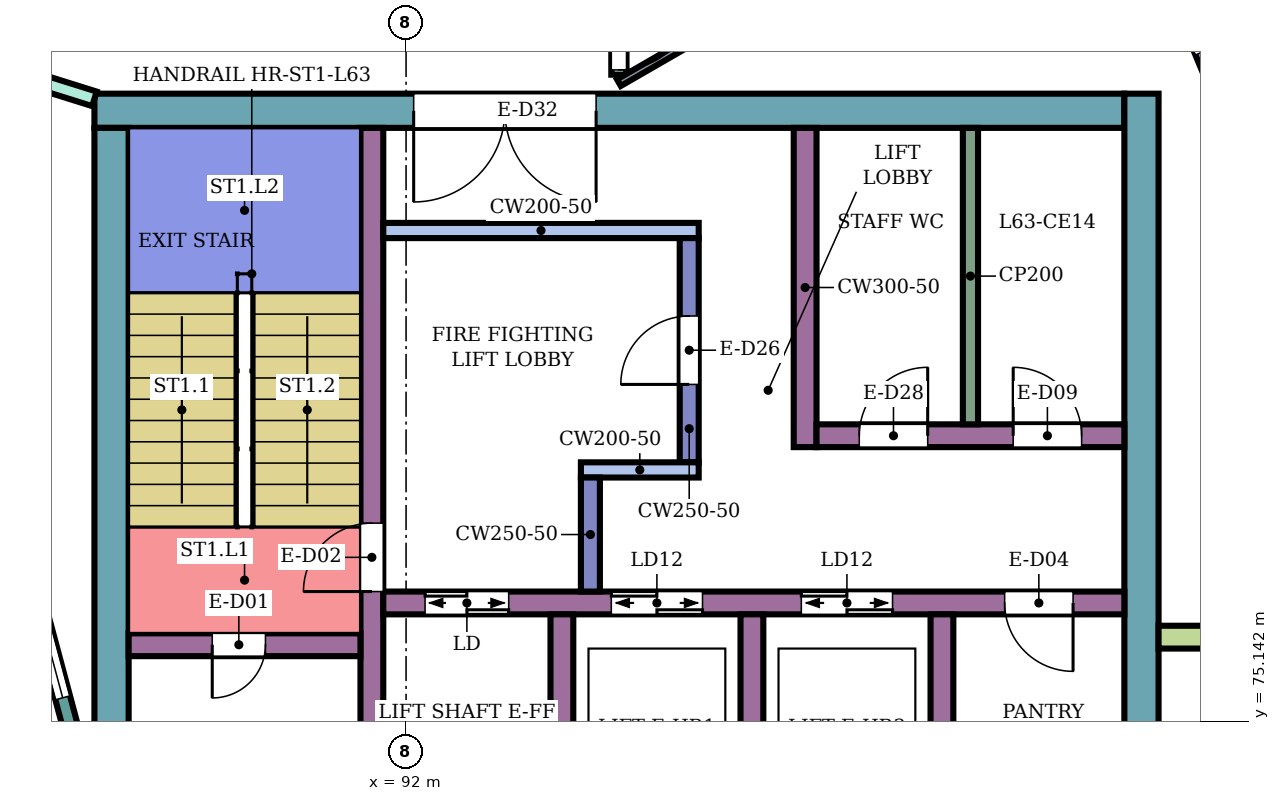
"""IFC4 building model, lengths in metres.
Left out: names, types, materials, properties, quantities, classifications, styles, units other than length and angle.
Written with IfcOpenShell. Run it as: python <this file> out.ifc"""

import sys

from ifc_helpers import new_model, si_unit, direction, frame, frame_2d, origin, place, context, subcontext, project, spatial, rectangle, extrude, element, fill, save


model = new_model("IFC4")
c1 = context("Model", 3, precision=1e-05, world=origin(), true_north=direction((0.0, 1.0)))
c2 = subcontext(c1, "Body", "Model", "MODEL_VIEW")
j1 = project(units=[si_unit("LENGTHUNIT", "METRE"), si_unit("PLANEANGLEUNIT", "RADIAN")], contexts=[c1])
p1 = place(None, origin())
s1 = spatial("IfcSite", under=j1, at=p1, CompositionType="ELEMENT")
p2 = place(p1, origin())
s2 = spatial("IfcBuilding", under=s1, at=p2, CompositionType="ELEMENT")
p3 = place(p2, frame((0.0, 0.0, 275.7)))
s3 = spatial("IfcBuildingStorey", under=s2, at=p3, CompositionType="ELEMENT", Elevation=275.7)
p4 = place(p3, frame((87.9, 83.175, 0.0), z_axis=(0.0, 0.0, 1.0), x_axis=(1.0, 0.0, 0.0)))
e1 = element("IfcWall", 1, at=p4, inside=s3, PredefinedType="SHEAR", context=c2, shape_type="SweptSolid", body=[
    extrude(rectangle(XDim=13.55, YDim=0.45, at=frame_2d((6.775, 0.0))), origin(), (0.0, 0.0, 1.0), 3.88),
])
p5 = place(p4, frame((4.2, 0.0, 0.0)))
e2 = element("IfcOpeningElement", 2, at=p5, cuts=e1, PredefinedType="OPENING", context=c2, shape_type="SweptSolid", body=[
    extrude(rectangle(XDim=2.4, YDim=2.4, at=frame_2d((1.2, 1.2))), frame((0.0, 0.235, 0.0), z_axis=(0.0, -1.0, 0.0), x_axis=(1.0, 0.0, 0.0)), (0.0, 0.0, 1.0), 0.47),
])
p6 = place(p3, frame((88.125, 75.0, 0.0), z_axis=(0.0, 0.0, 1.0), x_axis=(0.0, 1.0, 0.0)))
e3 = element("IfcWall", 3, at=p6, inside=s3, PredefinedType="SHEAR", context=c2, shape_type="SweptSolid", body=[
    extrude(rectangle(XDim=7.95, YDim=0.45, at=frame_2d((3.975, 0.0))), origin(), (0.0, 0.0, 1.0), 3.88),
])
p7 = place(p3, frame((101.675, 66.6, 0.0), z_axis=(0.0, 0.0, 1.0), x_axis=(0.0, 1.0, 0.0)))
e4 = element("IfcWall", 4, at=p7, inside=s3, PredefinedType="SHEAR", context=c2, shape_type="SweptSolid", body=[
    extrude(rectangle(XDim=16.8, YDim=0.45, at=frame_2d((8.4, 0.0))), origin(), (0.0, 0.0, 1.0), 3.88),
])
p8 = place(p3, frame((91.55, 75.0, 0.0), z_axis=(0.0, 0.0, 1.0), x_axis=(0.0, 1.0, 0.0)))
e5 = element("IfcWall", 5, at=p8, inside=s3, PredefinedType="SHEAR", context=c2, shape_type="SweptSolid", body=[
    extrude(rectangle(XDim=7.95, YDim=0.3, at=frame_2d((3.975, 0.0))), origin(), (0.0, 0.0, 1.0), 3.88),
])
p9 = place(p8, frame((1.85, 0.0, 0.0)))
e6 = element("IfcOpeningElement", 6, at=p9, cuts=e5, PredefinedType="OPENING", context=c2, shape_type="SweptSolid", body=[
    extrude(rectangle(XDim=0.9, YDim=2.1, at=frame_2d((0.45, 1.05))), frame((0.0, 0.16, 0.0), z_axis=(0.0, -1.0, 0.0), x_axis=(1.0, 0.0, 0.0)), (0.0, 0.0, 1.0), 0.32),
])
p10 = place(p3, frame((88.35, 76.15, 0.0), z_axis=(0.0, 0.0, 1.0), x_axis=(1.0, 0.0, 0.0)))
e7 = element("IfcWall", 7, at=p10, inside=s3, PredefinedType="SHEAR", context=c2, shape_type="SweptSolid", body=[
    extrude(rectangle(XDim=3.05, YDim=0.3, at=frame_2d((1.525, 0.0))), origin(), (0.0, 0.0, 1.0), 3.88),
])
p11 = place(p10, frame((1.1, 0.0, 0.0)))
e8 = element("IfcOpeningElement", 8, at=p11, cuts=e7, PredefinedType="OPENING", context=c2, shape_type="SweptSolid", body=[
    extrude(rectangle(XDim=0.7, YDim=2.0, at=frame_2d((0.35, 1.0))), frame((0.0, 0.16, 0.0), z_axis=(0.0, -1.0, 0.0), x_axis=(1.0, 0.0, 0.0)), (0.0, 0.0, 1.0), 0.32),
])
p12 = place(p3, frame((91.7, 76.7, 0.0), z_axis=(0.0, 0.0, 1.0), x_axis=(1.0, 0.0, 0.0)))
e9 = element("IfcWall", 9, at=p12, inside=s3, PredefinedType="SHEAR", context=c2, shape_type="SweptSolid", body=[
    extrude(rectangle(XDim=9.75, YDim=0.3, at=frame_2d((4.875, 0.0))), origin(), (0.0, 0.0, 1.0), 3.88),
])
p13 = place(p12, frame((0.55, 0.0, 0.0)))
e10 = element("IfcOpeningElement", 10, at=p13, cuts=e9, PredefinedType="OPENING", context=c2, shape_type="SweptSolid", body=[
    extrude(rectangle(XDim=1.1, YDim=2.1, at=frame_2d((0.55, 1.05))), frame((0.0, 0.16, 0.0), z_axis=(0.0, -1.0, 0.0), x_axis=(1.0, 0.0, 0.0)), (0.0, 0.0, 1.0), 0.32),
])
p14 = place(p12, frame((3.0, 0.0, 0.0)))
e11 = element("IfcOpeningElement", 11, at=p14, cuts=e9, PredefinedType="OPENING", context=c2, shape_type="SweptSolid", body=[
    extrude(rectangle(XDim=1.2, YDim=2.1, at=frame_2d((0.6, 1.05))), frame((0.0, 0.16, 0.0), z_axis=(0.0, -1.0, 0.0), x_axis=(1.0, 0.0, 0.0)), (0.0, 0.0, 1.0), 0.32),
])
p15 = place(p12, frame((5.5, 0.0, 0.0)))
e12 = element("IfcOpeningElement", 12, at=p15, cuts=e9, PredefinedType="OPENING", context=c2, shape_type="SweptSolid", body=[
    extrude(rectangle(XDim=1.2, YDim=2.1, at=frame_2d((0.6, 1.05))), frame((0.0, 0.16, 0.0), z_axis=(0.0, -1.0, 0.0), x_axis=(1.0, 0.0, 0.0)), (0.0, 0.0, 1.0), 0.32),
])
p16 = place(p12, frame((8.175, 0.0, 0.0)))
e13 = element("IfcOpeningElement", 13, at=p16, cuts=e9, PredefinedType="OPENING", context=c2, shape_type="SweptSolid", body=[
    extrude(rectangle(XDim=0.9, YDim=2.1, at=frame_2d((0.45, 1.05))), frame((0.0, 0.16, 0.0), z_axis=(0.0, -1.0, 0.0), x_axis=(1.0, 0.0, 0.0)), (0.0, 0.0, 1.0), 0.32),
])
for number, where, z_axis, x_axis in (
    (14, (94.05, 74.0, 0.0), (0.0, 0.0, 1.0), (0.0, 1.0, 0.0)),
    (15, (96.55, 74.0, 0.0), (0.0, 0.0, 1.0), (0.0, 1.0, 0.0)),
    (16, (99.05, 74.0, 0.0), (0.0, 0.0, 1.0), (0.0, 1.0, 0.0)),
):
    element("IfcWall", number, at=place(p3, frame(where, z_axis=z_axis, x_axis=x_axis)), inside=s3, PredefinedType="SHEAR", context=c2, shape_type="SweptSolid", body=[
        extrude(rectangle(XDim=2.55, YDim=0.3, at=frame_2d((1.275, 0.0))), origin(), (0.0, 0.0, 1.0), 3.88),
    ])
p17 = place(p3, frame((91.7, 81.6, 0.0), z_axis=(0.0, 0.0, 1.0), x_axis=(1.0, 0.0, 0.0)))
e17 = element("IfcWall", 17, at=p17, inside=s3, PredefinedType="SHEAR", context=c2, shape_type="SweptSolid", body=[
    extrude(rectangle(XDim=4.15, YDim=0.2, at=frame_2d((2.075, 0.0))), origin(), (0.0, 0.0, 1.0), 3.88),
])
p18 = place(p3, frame((95.725, 78.55, 0.0), z_axis=(0.0, 0.0, 1.0), x_axis=(0.0, 1.0, 0.0)))
e18 = element("IfcWall", 18, at=p18, inside=s3, PredefinedType="SHEAR", context=c2, shape_type="SweptSolid", body=[
    extrude(rectangle(XDim=2.95, YDim=0.25, at=frame_2d((1.475, 0.0))), origin(), (0.0, 0.0, 1.0), 3.88),
])
p19 = place(p18, frame((1.025, 0.0, 0.0)))
e19 = element("IfcOpeningElement", 19, at=p19, cuts=e18, PredefinedType="OPENING", context=c2, shape_type="SweptSolid", body=[
    extrude(rectangle(XDim=0.9, YDim=2.1, at=frame_2d((0.45, 1.05))), frame((0.0, 0.135, 0.0), z_axis=(0.0, -1.0, 0.0), x_axis=(1.0, 0.0, 0.0)), (0.0, 0.0, 1.0), 0.27),
])
p20 = place(p3, frame((94.3, 78.45, 0.0), z_axis=(0.0, 0.0, 1.0), x_axis=(1.0, 0.0, 0.0)))
e20 = element("IfcWall", 20, at=p20, inside=s3, PredefinedType="SHEAR", context=c2, shape_type="SweptSolid", body=[
    extrude(rectangle(XDim=1.55, YDim=0.2, at=frame_2d((0.775, 0.0))), origin(), (0.0, 0.0, 1.0), 3.88),
])
p21 = place(p3, frame((94.425, 76.85, 0.0), z_axis=(0.0, 0.0, 1.0), x_axis=(0.0, 1.0, 0.0)))
e21 = element("IfcWall", 21, at=p21, inside=s3, PredefinedType="SHEAR", context=c2, shape_type="SweptSolid", body=[
    extrude(rectangle(XDim=1.5, YDim=0.25, at=frame_2d((0.75, 0.0))), origin(), (0.0, 0.0, 1.0), 3.88),
])
p22 = place(p3, frame((97.25, 78.75, 0.0), z_axis=(0.0, 0.0, 1.0), x_axis=(0.0, 1.0, 0.0)))
e22 = element("IfcWall", 22, at=p22, inside=s3, PredefinedType="SHEAR", context=c2, shape_type="SweptSolid", body=[
    extrude(rectangle(XDim=4.2, YDim=0.3, at=frame_2d((2.1, 0.0))), origin(), (0.0, 0.0, 1.0), 3.88),
])
p23 = place(p3, frame((97.4, 78.9, 0.0), z_axis=(0.0, 0.0, 1.0), x_axis=(1.0, 0.0, 0.0)))
e23 = element("IfcWall", 23, at=p23, inside=s3, PredefinedType="SHEAR", context=c2, shape_type="SweptSolid", body=[
    extrude(rectangle(XDim=4.05, YDim=0.3, at=frame_2d((2.025, 0.0))), origin(), (0.0, 0.0, 1.0), 3.88),
])
p24 = place(p23, frame((0.562, 0.0, 0.0)))
e24 = element("IfcOpeningElement", 24, at=p24, cuts=e23, PredefinedType="OPENING", context=c2, shape_type="SweptSolid", body=[
    extrude(rectangle(XDim=0.9, YDim=2.1, at=frame_2d((0.45, 1.05))), frame((0.0, 0.16, 0.0), z_axis=(0.0, -1.0, 0.0), x_axis=(1.0, 0.0, 0.0)), (0.0, 0.0, 1.0), 0.32),
])
p25 = place(p23, frame((2.587, 0.0, 0.0)))
e25 = element("IfcOpeningElement", 25, at=p25, cuts=e23, PredefinedType="OPENING", context=c2, shape_type="SweptSolid", body=[
    extrude(rectangle(XDim=0.9, YDim=2.1, at=frame_2d((0.45, 1.05))), frame((0.0, 0.16, 0.0), z_axis=(0.0, -1.0, 0.0), x_axis=(1.0, 0.0, 0.0)), (0.0, 0.0, 1.0), 0.32),
])
p26 = place(p3, frame((103.568, 81.315, 0.0), z_axis=(0.0, 0.0, 1.0), x_axis=(-0.382690319485, 0.923876679743, 0.0)))
e26 = element("IfcWall", 26, at=p26, inside=s3, PredefinedType="NOTDEFINED", context=c2, shape_type="SweptSolid", body=[
    extrude(rectangle(XDim=6.369, YDim=0.2, at=frame_2d((3.185, 0.0))), origin(), (0.0, 0.0, 1.0), 4.2),
])
p27 = place(p26, frame((1.2, 0.0, 0.9)))
e27 = element("IfcOpeningElement", 27, at=p27, cuts=e26, PredefinedType="OPENING", context=c2, shape_type="SweptSolid", body=[
    extrude(rectangle(XDim=1.2, YDim=2.7, at=frame_2d((0.6, 1.35))), frame((0.0, 0.11, 0.0), z_axis=(0.0, -1.0, 0.0), x_axis=(1.0, 0.0, 0.0)), (0.0, 0.0, 1.0), 0.22),
])
p28 = place(p26, frame((2.85, 0.0, 0.0)))
e28 = element("IfcOpeningElement", 28, at=p28, cuts=e26, PredefinedType="OPENING", context=c2, shape_type="SweptSolid", body=[
    extrude(rectangle(XDim=1.8, YDim=2.7, at=frame_2d((0.9, 1.35))), frame((0.0, 0.11, 0.0), z_axis=(0.0, -1.0, 0.0), x_axis=(1.0, 0.0, 0.0)), (0.0, 0.0, 1.0), 0.22),
])
p29 = place(p3, frame((101.9, 76.25, 0.0), z_axis=(0.0, 0.0, 1.0), x_axis=(1.0, 0.0, 0.0)))
e29 = element("IfcWall", 29, at=p29, inside=s3, PredefinedType="NOTDEFINED", context=c2, shape_type="SweptSolid", body=[
    extrude(rectangle(XDim=2.416, YDim=0.3, at=frame_2d((1.208, 0.0))), origin(), (0.0, 0.0, 1.0), 4.2),
])
p30 = place(p3, frame((87.604, 75.0, 0.0), z_axis=(0.0, 0.0, 1.0), x_axis=(-0.258789828301, 0.965933654434, 0.0)))
e30 = element("IfcWall", 30, at=p30, inside=s3, PredefinedType="NOTDEFINED", context=c2, shape_type="SweptSolid", body=[
    extrude(rectangle(XDim=3.936, YDim=0.2, at=frame_2d((1.968, 0.0))), origin(), (0.0, 0.0, 1.0), 4.2),
])
p31 = place(p30, frame((0.468, 0.0, 0.9)))
e31 = element("IfcOpeningElement", 31, at=p31, cuts=e30, PredefinedType="OPENING", context=c2, shape_type="SweptSolid", body=[
    extrude(rectangle(XDim=3.0, YDim=2.3, at=frame_2d((1.5, 1.15))), frame((0.0, 0.11, 0.0), z_axis=(0.0, -1.0, 0.0), x_axis=(1.0, 0.0, 0.0)), (0.0, 0.0, 1.0), 0.22),
])
p32 = place(p3, frame((85.587, 84.057, 0.0), z_axis=(0.0, 0.0, 1.0), x_axis=(0.954239513179, -0.299043393987, 0.0)))
e32 = element("IfcWall", 32, at=p32, inside=s3, PredefinedType="PARTITIONING", context=c2, shape_type="SweptSolid", body=[
    extrude(rectangle(XDim=2.424, YDim=0.2, at=frame_2d((1.212, 0.0))), origin(), (0.0, 0.0, 1.0), 3.75),
])
p33 = place(p32, frame((0.762, 0.0, 0.0)))
e33 = element("IfcOpeningElement", 33, at=p33, cuts=e32, PredefinedType="OPENING", context=c2, shape_type="SweptSolid", body=[
    extrude(rectangle(XDim=0.9, YDim=2.1, at=frame_2d((0.45, 1.05))), frame((0.0, 0.11, 0.0), z_axis=(0.0, -1.0, 0.0), x_axis=(1.0, 0.0, 0.0)), (0.0, 0.0, 1.0), 0.22),
])
p34 = place(p3, frame((94.8, 83.65, 0.0), z_axis=(0.0, 0.0, 1.0), x_axis=(0.0, 1.0, 0.0)))
e34 = element("IfcWall", 34, at=p34, inside=s3, PredefinedType="PARTITIONING", context=c2, shape_type="SweptSolid", body=[
    extrude(rectangle(XDim=1.25, YDim=0.2, at=frame_2d((0.625, 0.0))), origin(), (0.0, 0.0, 1.0), 3.75),
])
p35 = place(p34, frame((0.062, 0.0, 0.0)))
e35 = element("IfcOpeningElement", 35, at=p35, cuts=e34, PredefinedType="OPENING", context=c2, shape_type="SweptSolid", body=[
    extrude(rectangle(XDim=1.0, YDim=2.1, at=frame_2d((0.5, 1.05))), frame((0.0, 0.11, 0.0), z_axis=(0.0, -1.0, 0.0), x_axis=(1.0, 0.0, 0.0)), (0.0, 0.0, 1.0), 0.22),
])
p36 = place(p3, frame((94.8, 83.545, 0.0), z_axis=(0.0, 0.0, 1.0), x_axis=(0.866044015472, 0.499967762227, 0.0)))
e36 = element("IfcWall", 36, at=p36, inside=s3, PredefinedType="PARTITIONING", context=c2, shape_type="SweptSolid", body=[
    extrude(rectangle(XDim=7.208, YDim=0.1, at=frame_2d((3.604, 0.0))), origin(), (0.0, 0.0, 1.0), 3.75),
])
p37 = place(p36, frame((3.129, 0.0, 0.0)))
e37 = element("IfcOpeningElement", 37, at=p37, cuts=e36, PredefinedType="OPENING", context=c2, shape_type="SweptSolid", body=[
    extrude(rectangle(XDim=0.9, YDim=2.1, at=frame_2d((0.45, 1.05))), frame((0.0, 0.06, 0.0), z_axis=(0.0, -1.0, 0.0), x_axis=(1.0, 0.0, 0.0)), (0.0, 0.0, 1.0), 0.12),
])
p38 = place(p3, frame((99.425, 79.05, 0.0), z_axis=(0.0, 0.0, 1.0), x_axis=(0.0, 1.0, 0.0)))
e38 = element("IfcWall", 38, at=p38, inside=s3, PredefinedType="PARTITIONING", context=c2, shape_type="SweptSolid", body=[
    extrude(rectangle(XDim=3.9, YDim=0.2, at=frame_2d((1.95, 0.0))), origin(), (0.0, 0.0, 1.0), 3.88),
])
p39 = place(p28, frame((1.8, 0.0, 0.0), z_axis=(0.0, 0.0, 1.0), x_axis=(-1.0, 0.0, 0.0)))
e39 = element("IfcDoor", 39, at=p39, inside=s3, OperationType="DOUBLE_DOOR_SINGLE_SWING", PredefinedType="DOOR", context=c2, shape_type="SweptSolid", body=[
    extrude(rectangle(XDim=1.8, YDim=2.7, at=frame_2d((0.9, 1.35))), frame((0.0, 0.025, 0.0), z_axis=(0.0, -1.0, 0.0), x_axis=(1.0, 0.0, 0.0)), (0.0, 0.0, 1.0), 0.05),
])
fill(e28, e39)
p40 = place(p31, origin())
e40 = element("IfcWindow", 40, at=p40, inside=s3, PartitioningType="SINGLE_PANEL", PredefinedType="WINDOW", context=c2, shape_type="SweptSolid", body=[
    extrude(rectangle(XDim=3.0, YDim=2.3, at=frame_2d((1.5, 1.15))), frame((0.0, 0.03, 0.0), z_axis=(0.0, -1.0, 0.0), x_axis=(1.0, 0.0, 0.0)), (0.0, 0.0, 1.0), 0.06),
])
fill(e31, e40)
p41 = place(p35, frame((1.0, 0.0, 0.0), z_axis=(0.0, 0.0, 1.0), x_axis=(-1.0, 0.0, 0.0)))
e41 = element("IfcDoor", 41, at=p41, inside=s3, OperationType="SINGLE_SWING_LEFT", PredefinedType="DOOR", context=c2, shape_type="SweptSolid", body=[
    extrude(rectangle(XDim=1.0, YDim=2.1, at=frame_2d((0.5, 1.05))), frame((0.0, 0.025, 0.0), z_axis=(0.0, -1.0, 0.0), x_axis=(1.0, 0.0, 0.0)), (0.0, 0.0, 1.0), 0.05),
])
fill(e35, e41)
p42 = place(p11, frame((0.7, 0.0, 0.0), z_axis=(0.0, 0.0, 1.0), x_axis=(-1.0, 0.0, 0.0)))
e42 = element("IfcDoor", 42, at=p42, inside=s3, OperationType="SINGLE_SWING_RIGHT", PredefinedType="DOOR", context=c2, shape_type="SweptSolid", body=[
    extrude(rectangle(XDim=0.7, YDim=2.0, at=frame_2d((0.35, 1.0))), frame((0.0, 0.025, 0.0), z_axis=(0.0, -1.0, 0.0), x_axis=(1.0, 0.0, 0.0)), (0.0, 0.0, 1.0), 0.05),
])
fill(e8, e42)
p43 = place(p9, origin())
e43 = element("IfcDoor", 43, at=p43, inside=s3, OperationType="SINGLE_SWING_LEFT", PredefinedType="DOOR", context=c2, shape_type="SweptSolid", body=[
    extrude(rectangle(XDim=0.9, YDim=2.1, at=frame_2d((0.45, 1.05))), frame((0.0, 0.025, 0.0), z_axis=(0.0, -1.0, 0.0), x_axis=(1.0, 0.0, 0.0)), (0.0, 0.0, 1.0), 0.05),
])
fill(e6, e43)
p44 = place(p13, origin())
e44 = element("IfcDoor", 44, at=p44, inside=s3, OperationType="DOUBLE_DOOR_SLIDING", PredefinedType="DOOR", context=c2, shape_type="SweptSolid", body=[
    extrude(rectangle(XDim=1.1, YDim=2.1, at=frame_2d((0.55, 1.05))), frame((0.0, 0.025, 0.0), z_axis=(0.0, -1.0, 0.0), x_axis=(1.0, 0.0, 0.0)), (0.0, 0.0, 1.0), 0.05),
])
fill(e10, e44)
p45 = place(p14, origin())
e45 = element("IfcDoor", 45, at=p45, inside=s3, OperationType="DOUBLE_DOOR_SLIDING", PredefinedType="DOOR", context=c2, shape_type="SweptSolid", body=[
    extrude(rectangle(XDim=1.2, YDim=2.1, at=frame_2d((0.6, 1.05))), frame((0.0, 0.025, 0.0), z_axis=(0.0, -1.0, 0.0), x_axis=(1.0, 0.0, 0.0)), (0.0, 0.0, 1.0), 0.05),
])
fill(e11, e45)
p46 = place(p15, origin())
e46 = element("IfcDoor", 46, at=p46, inside=s3, OperationType="DOUBLE_DOOR_SLIDING", PredefinedType="DOOR", context=c2, shape_type="SweptSolid", body=[
    extrude(rectangle(XDim=1.2, YDim=2.1, at=frame_2d((0.6, 1.05))), frame((0.0, 0.025, 0.0), z_axis=(0.0, -1.0, 0.0), x_axis=(1.0, 0.0, 0.0)), (0.0, 0.0, 1.0), 0.05),
])
fill(e12, e46)
p47 = place(p16, frame((0.9, 0.0, 0.0), z_axis=(0.0, 0.0, 1.0), x_axis=(-1.0, 0.0, 0.0)))
e47 = element("IfcDoor", 47, at=p47, inside=s3, OperationType="SINGLE_SWING_LEFT", PredefinedType="DOOR", context=c2, shape_type="SweptSolid", body=[
    extrude(rectangle(XDim=0.9, YDim=2.1, at=frame_2d((0.45, 1.05))), frame((0.0, 0.025, 0.0), z_axis=(0.0, -1.0, 0.0), x_axis=(1.0, 0.0, 0.0)), (0.0, 0.0, 1.0), 0.05),
])
fill(e13, e47)
p48 = place(p19, origin())
e48 = element("IfcDoor", 48, at=p48, inside=s3, OperationType="SINGLE_SWING_LEFT", PredefinedType="DOOR", context=c2, shape_type="SweptSolid", body=[
    extrude(rectangle(XDim=0.9, YDim=2.1, at=frame_2d((0.45, 1.05))), frame((0.0, 0.025, 0.0), z_axis=(0.0, -1.0, 0.0), x_axis=(1.0, 0.0, 0.0)), (0.0, 0.0, 1.0), 0.05),
])
fill(e19, e48)
p49 = place(p24, origin())
e49 = element("IfcDoor", 49, at=p49, inside=s3, OperationType="SINGLE_SWING_RIGHT", PredefinedType="DOOR", context=c2, shape_type="SweptSolid", body=[
    extrude(rectangle(XDim=0.9, YDim=2.1, at=frame_2d((0.45, 1.05))), frame((0.0, 0.025, 0.0), z_axis=(0.0, -1.0, 0.0), x_axis=(1.0, 0.0, 0.0)), (0.0, 0.0, 1.0), 0.05),
])
fill(e24, e49)
p50 = place(p25, origin())
e50 = element("IfcDoor", 50, at=p50, inside=s3, OperationType="SINGLE_SWING_LEFT", PredefinedType="DOOR", context=c2, shape_type="SweptSolid", body=[
    extrude(rectangle(XDim=0.9, YDim=2.1, at=frame_2d((0.45, 1.05))), frame((0.0, 0.025, 0.0), z_axis=(0.0, -1.0, 0.0), x_axis=(1.0, 0.0, 0.0)), (0.0, 0.0, 1.0), 0.05),
])
fill(e25, e50)
p51 = place(p5, frame((2.4, 0.0, 0.0), z_axis=(0.0, 0.0, 1.0), x_axis=(-1.0, 0.0, 0.0)))
e51 = element("IfcDoor", 51, at=p51, inside=s3, OperationType="DOUBLE_DOOR_SINGLE_SWING", PredefinedType="DOOR", context=c2, shape_type="SweptSolid", body=[
    extrude(rectangle(XDim=2.4, YDim=2.4, at=frame_2d((1.2, 1.2))), frame((0.0, 0.025, 0.0), z_axis=(0.0, -1.0, 0.0), x_axis=(1.0, 0.0, 0.0)), (0.0, 0.0, 1.0), 0.05),
])
fill(e2, e51)
save(model, sys.argv[1])
